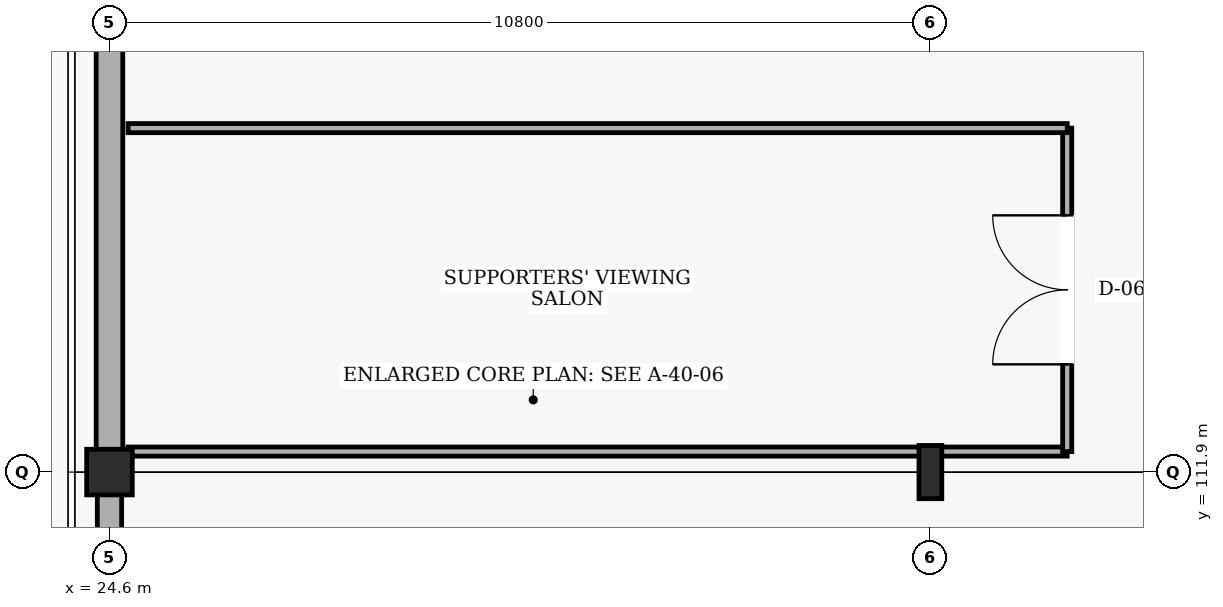
"""IFC4 building model, lengths in metres.
Left out: names, types, materials, properties, quantities, classifications, styles, units other than length and angle.
Written with IfcOpenShell. Run it as: python <this file> out.ifc"""

import sys

from ifc_helpers import new_model, si_unit, direction, frame, frame_2d, origin, origin_2d, place, context, subcontext, project, spatial, rectangle, i_section, extrude, element, fill, save


model = new_model("IFC4")
c1 = context("Model", 3, precision=1e-05, world=origin(), true_north=direction((0.0, 1.0)))
c2 = subcontext(c1, "Body", "Model", "MODEL_VIEW")
j1 = project(units=[si_unit("LENGTHUNIT", "METRE"), si_unit("PLANEANGLEUNIT", "RADIAN")], contexts=[c1])
p1 = place(None, origin())
s1 = spatial("IfcSite", under=j1, at=p1, CompositionType="ELEMENT")
p2 = place(p1, origin())
s2 = spatial("IfcBuilding", under=s1, at=p2, CompositionType="ELEMENT")
p3 = place(p2, frame((0.0, 0.0, 15.0)))
s3 = spatial("IfcBuildingStorey", under=s2, at=p3, CompositionType="ELEMENT", Elevation=15.0)
p4 = place(p3, frame((24.6, 111.9, 0.0), z_axis=(0.0, 0.0, 1.0), x_axis=(1.0, 0.0, 0.0)))
e1 = element("IfcColumn", 1, at=p4, inside=s3, PredefinedType="COLUMN", context=c2, shape_type="SweptSolid", body=[
    extrude(rectangle(XDim=0.6, YDim=0.6, at=origin_2d()), origin(), (0.0, 0.0, 1.0), 4.8),
])
p5 = place(p3, frame((35.4, 111.9, 0.0), z_axis=(0.0, 0.0, 1.0), x_axis=(1.0, 0.0, 0.0)))
e2 = element("IfcColumn", 2, at=p5, inside=s3, PredefinedType="COLUMN", context=c2, shape_type="SweptSolid", body=[
    extrude(i_section(OverallWidth=0.3, OverallDepth=0.7, WebThickness=0.017, FlangeThickness=0.032, at=origin_2d()), origin(), (0.0, 0.0, 1.0), 4.8),
])
p6 = place(p3, frame((24.6, 104.995, 0.0), z_axis=(0.0, 0.0, 1.0), x_axis=(0.0, 1.0, 0.0)))
e3 = element("IfcWall", 3, at=p6, inside=s3, PredefinedType="SOLIDWALL", context=c2, shape_type="SweptSolid", body=[
    extrude(rectangle(XDim=6.61, YDim=0.32, at=frame_2d((3.305, 0.0))), origin(), (0.0, 0.0, 1.0), 3.88),
])
p7 = place(p6, frame((2.005, 0.0, 0.9)))
e4 = element("IfcOpeningElement", 4, at=p7, cuts=e3, PredefinedType="OPENING", context=c2, shape_type="SweptSolid", body=[
    extrude(rectangle(XDim=2.6, YDim=2.1, at=frame_2d((1.3, 1.05))), frame((0.0, 0.17, 0.0), z_axis=(0.0, -1.0, 0.0), x_axis=(1.0, 0.0, 0.0)), (0.0, 0.0, 1.0), 0.34),
])
p8 = place(p3, frame((24.6, 112.195, 0.0), z_axis=(0.0, 0.0, 1.0), x_axis=(0.0, 1.0, 0.0)))
e5 = element("IfcWall", 5, at=p8, inside=s3, PredefinedType="SOLIDWALL", context=c2, shape_type="SweptSolid", body=[
    extrude(rectangle(XDim=13.985, YDim=0.35, at=frame_2d((6.992, 0.0))), origin(), (0.0, 0.0, 1.0), 3.58),
])
p9 = place(p8, frame((6.4, 0.0, 0.0)))
e6 = element("IfcOpeningElement", 6, at=p9, cuts=e5, PredefinedType="OPENING", context=c2, shape_type="SweptSolid", body=[
    extrude(rectangle(XDim=1.8, YDim=2.2, at=frame_2d((0.9, 1.1))), frame((0.0, 0.185, 0.0), z_axis=(0.0, -1.0, 0.0), x_axis=(1.0, 0.0, 0.0)), (0.0, 0.0, 1.0), 0.37),
])
p10 = place(p3, frame((24.845, 112.17, 0.0), z_axis=(0.0, 0.0, 1.0), x_axis=(1.0, 0.0, 0.0)))
e7 = element("IfcWall", 7, at=p10, inside=s3, PredefinedType="PARTITIONING", context=c2, shape_type="SweptSolid", body=[
    extrude(rectangle(XDim=12.355, YDim=0.12, at=frame_2d((6.177, 0.0))), origin(), (0.0, 0.0, 1.0), 3.68),
])
p11 = place(p3, frame((37.2, 112.17, 0.0), z_axis=(0.0, 0.0, 1.0), x_axis=(0.0, 1.0, 0.0)))
e8 = element("IfcWall", 8, at=p11, inside=s3, PredefinedType="PARTITIONING", context=c2, shape_type="SweptSolid", body=[
    extrude(rectangle(XDim=4.255, YDim=0.12, at=frame_2d((2.128, 0.0))), origin(), (0.0, 0.0, 1.0), 4.5),
])
p12 = place(p11, frame((1.148, 0.0, 0.0)))
e9 = element("IfcOpeningElement", 9, at=p12, cuts=e8, PredefinedType="OPENING", context=c2, shape_type="SweptSolid", body=[
    extrude(rectangle(XDim=1.96, YDim=2.3, at=frame_2d((0.98, 1.15))), frame((0.0, 0.07, 0.0), z_axis=(0.0, -1.0, 0.0), x_axis=(1.0, 0.0, 0.0)), (0.0, 0.0, 1.0), 0.14),
])
p13 = place(p3, frame((37.2, 116.425, 0.0), z_axis=(0.0, 0.0, 1.0), x_axis=(-1.0, 0.0, 0.0)))
e10 = element("IfcWall", 10, at=p13, inside=s3, PredefinedType="PARTITIONING", context=c2, shape_type="SweptSolid", body=[
    extrude(rectangle(XDim=12.355, YDim=0.12, at=frame_2d((6.177, 0.0))), origin(), (0.0, 0.0, 1.0), 4.5),
])
p14 = place(p12, origin())
e11 = element("IfcDoor", 11, at=p14, inside=s3, OperationType="DOUBLE_DOOR_SINGLE_SWING", PredefinedType="DOOR", context=c2, shape_type="SweptSolid", body=[
    extrude(rectangle(XDim=1.96, YDim=2.3, at=frame_2d((0.98, 1.15))), frame((0.0, 0.025, 0.0), z_axis=(0.0, -1.0, 0.0), x_axis=(1.0, 0.0, 0.0)), (0.0, 0.0, 1.0), 0.05),
])
fill(e9, e11)
save(model, sys.argv[1])
